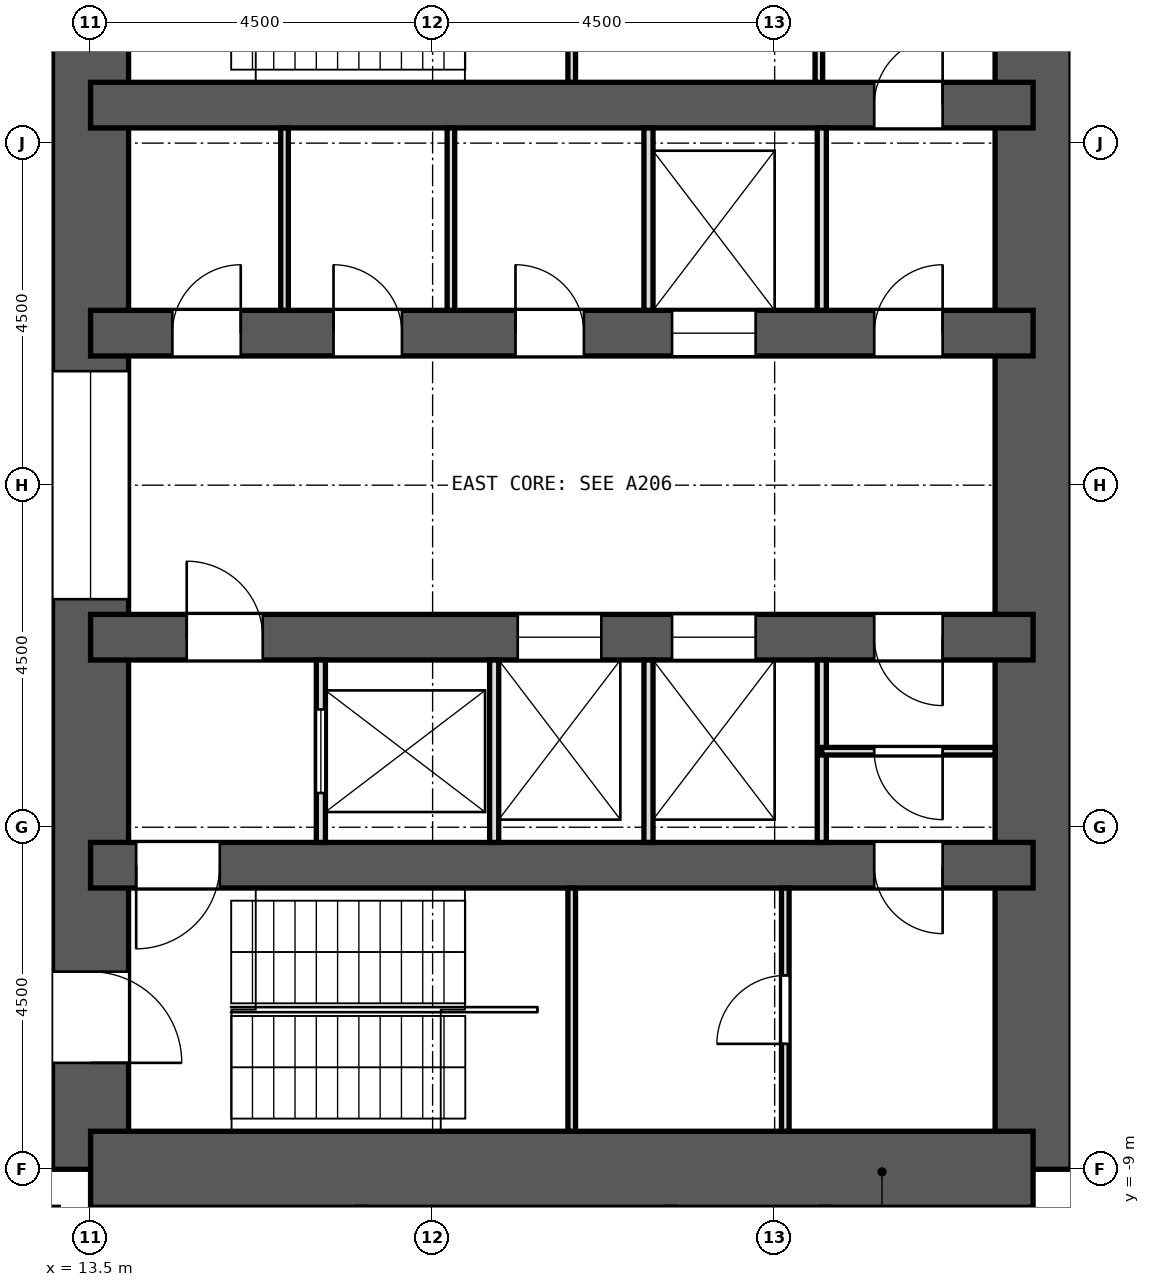
"""IFC4 building model, lengths in metres.
Left out: names, types, materials, properties, quantities, classifications, styles, units other than length and angle.
Written with IfcOpenShell. Run it as: python <this file> out.ifc"""

import sys

from ifc_helpers import new_model, si_unit, direction, frame, frame_2d, origin, place, context, subcontext, project, spatial, rectangle, extrude, element, fill, save


model = new_model("IFC4")
c1 = context("Model", 3, precision=1e-05, world=origin(), true_north=direction((0.0, 1.0)))
c2 = subcontext(c1, "Body", "Model", "MODEL_VIEW")
j1 = project(units=[si_unit("LENGTHUNIT", "METRE"), si_unit("PLANEANGLEUNIT", "RADIAN")], contexts=[c1])
p1 = place(None, origin())
s1 = spatial("IfcSite", under=j1, at=p1, CompositionType="ELEMENT")
p2 = place(p1, origin())
s2 = spatial("IfcBuilding", under=s1, at=p2, CompositionType="ELEMENT")
p3 = place(p2, frame((0.0, 0.0, 13.4)))
s3 = spatial("IfcBuildingStorey", under=s2, at=p3, CompositionType="ELEMENT", Elevation=13.4)
p4 = place(p3, frame((13.5, -9.0, 0.0), z_axis=(0.0, 0.0, 1.0), x_axis=(0.0, 1.0, 0.0)))
e1 = element("IfcWall", 1, at=p4, inside=s3, PredefinedType="SHEAR", context=c2, shape_type="SweptSolid", body=[
    extrude(rectangle(XDim=18.0, YDim=1.0, at=frame_2d((9.0, 0.0))), origin(), (0.0, 0.0, 1.0), 4.2),
])
p5 = place(p4, frame((15.4, 0.0, 0.0)))
e2 = element("IfcOpeningElement", 2, at=p5, cuts=e1, PredefinedType="OPENING", context=c2, shape_type="SweptSolid", body=[
    extrude(rectangle(XDim=1.2, YDim=2.1, at=frame_2d((0.6, 1.05))), frame((0.0, 0.512, 0.0), z_axis=(0.0, -1.0, 0.0), x_axis=(1.0, 0.0, 0.0)), (0.0, 0.0, 1.0), 1.024),
])
p6 = place(p4, frame((1.4, 0.0, 0.0)))
e3 = element("IfcOpeningElement", 3, at=p6, cuts=e1, PredefinedType="OPENING", context=c2, shape_type="SweptSolid", body=[
    extrude(rectangle(XDim=1.2, YDim=2.1, at=frame_2d((0.6, 1.05))), frame((0.0, 0.512, 0.0), z_axis=(0.0, -1.0, 0.0), x_axis=(1.0, 0.0, 0.0)), (0.0, 0.0, 1.0), 1.024),
])
p7 = place(p4, frame((7.5, 0.0, 0.0)))
e4 = element("IfcOpeningElement", 4, at=p7, cuts=e1, PredefinedType="OPENING", context=c2, shape_type="SweptSolid", body=[
    extrude(rectangle(XDim=3.0, YDim=2.4, at=frame_2d((1.5, 1.2))), frame((0.0, 0.512, 0.0), z_axis=(0.0, -1.0, 0.0), x_axis=(1.0, 0.0, 0.0)), (0.0, 0.0, 1.0), 1.024),
])
p8 = place(p3, frame((25.9, -9.0, 0.0), z_axis=(0.0, 0.0, 1.0), x_axis=(0.0, 1.0, 0.0)))
e5 = element("IfcWall", 5, at=p8, inside=s3, PredefinedType="SHEAR", context=c2, shape_type="SweptSolid", body=[
    extrude(rectangle(XDim=18.0, YDim=1.0, at=frame_2d((9.0, 0.0))), origin(), (0.0, 0.0, 1.0), 4.2),
])
p9 = place(p3, frame((13.5, -9.0, 0.0), z_axis=(0.0, 0.0, 1.0), x_axis=(1.0, 0.0, 0.0)))
e6 = element("IfcWall", 6, at=p9, inside=s3, PredefinedType="SHEAR", context=c2, shape_type="SweptSolid", body=[
    extrude(rectangle(XDim=12.4, YDim=1.0, at=frame_2d((6.2, 0.0))), origin(), (0.0, 0.0, 1.0), 4.2),
])
p10 = place(p3, frame((13.5, 5.0, 0.0), z_axis=(0.0, 0.0, 1.0), x_axis=(1.0, 0.0, 0.0)))
e7 = element("IfcWall", 7, at=p10, inside=s3, PredefinedType="SHEAR", context=c2, shape_type="SweptSolid", body=[
    extrude(rectangle(XDim=12.4, YDim=0.6, at=frame_2d((6.2, 0.0))), origin(), (0.0, 0.0, 1.0), 4.2),
])
p11 = place(p10, frame((10.31, 0.0, 0.0)))
e8 = element("IfcOpeningElement", 8, at=p11, cuts=e7, PredefinedType="OPENING", context=c2, shape_type="SweptSolid", body=[
    extrude(rectangle(XDim=0.9, YDim=2.1, at=frame_2d((0.45, 1.05))), frame((0.0, 0.312, 0.0), z_axis=(0.0, -1.0, 0.0), x_axis=(1.0, 0.0, 0.0)), (0.0, 0.0, 1.0), 0.624),
])
p12 = place(p3, frame((13.5, -5.0, 0.0), z_axis=(0.0, 0.0, 1.0), x_axis=(1.0, 0.0, 0.0)))
e9 = element("IfcWall", 9, at=p12, inside=s3, PredefinedType="SHEAR", context=c2, shape_type="SweptSolid", body=[
    extrude(rectangle(XDim=12.4, YDim=0.6, at=frame_2d((6.2, 0.0))), origin(), (0.0, 0.0, 1.0), 4.2),
])
p13 = place(p12, frame((10.31, 0.0, 0.0)))
e10 = element("IfcOpeningElement", 10, at=p13, cuts=e9, PredefinedType="OPENING", context=c2, shape_type="SweptSolid", body=[
    extrude(rectangle(XDim=0.9, YDim=2.1, at=frame_2d((0.45, 1.05))), frame((0.0, 0.312, 0.0), z_axis=(0.0, -1.0, 0.0), x_axis=(1.0, 0.0, 0.0)), (0.0, 0.0, 1.0), 0.624),
])
p14 = place(p12, frame((0.6, 0.0, 0.0)))
e11 = element("IfcOpeningElement", 11, at=p14, cuts=e9, PredefinedType="OPENING", context=c2, shape_type="SweptSolid", body=[
    extrude(rectangle(XDim=1.1, YDim=2.1, at=frame_2d((0.55, 1.05))), frame((0.0, 0.312, 0.0), z_axis=(0.0, -1.0, 0.0), x_axis=(1.0, 0.0, 0.0)), (0.0, 0.0, 1.0), 0.624),
])
p15 = place(p3, frame((13.5, 2.0, 0.0), z_axis=(0.0, 0.0, 1.0), x_axis=(1.0, 0.0, 0.0)))
e12 = element("IfcWall", 12, at=p15, inside=s3, PredefinedType="SHEAR", context=c2, shape_type="SweptSolid", body=[
    extrude(rectangle(XDim=12.4, YDim=0.6, at=frame_2d((6.2, 0.0))), origin(), (0.0, 0.0, 1.0), 4.2),
])
p16 = place(p15, frame((7.65, 0.0, 0.0)))
e13 = element("IfcOpeningElement", 13, at=p16, cuts=e12, PredefinedType="OPENING", context=c2, shape_type="SweptSolid", body=[
    extrude(rectangle(XDim=1.1, YDim=2.1, at=frame_2d((0.55, 1.05))), frame((0.0, 0.312, 0.0), z_axis=(0.0, -1.0, 0.0), x_axis=(1.0, 0.0, 0.0)), (0.0, 0.0, 1.0), 0.624),
])
p17 = place(p15, frame((1.076, 0.0, 0.0)))
e14 = element("IfcOpeningElement", 14, at=p17, cuts=e12, PredefinedType="OPENING", context=c2, shape_type="SweptSolid", body=[
    extrude(rectangle(XDim=0.9, YDim=2.1, at=frame_2d((0.45, 1.05))), frame((0.0, 0.312, 0.0), z_axis=(0.0, -1.0, 0.0), x_axis=(1.0, 0.0, 0.0)), (0.0, 0.0, 1.0), 0.624),
])
p18 = place(p15, frame((3.196, 0.0, 0.0)))
e15 = element("IfcOpeningElement", 15, at=p18, cuts=e12, PredefinedType="OPENING", context=c2, shape_type="SweptSolid", body=[
    extrude(rectangle(XDim=0.9, YDim=2.1, at=frame_2d((0.45, 1.05))), frame((0.0, 0.312, 0.0), z_axis=(0.0, -1.0, 0.0), x_axis=(1.0, 0.0, 0.0)), (0.0, 0.0, 1.0), 0.624),
])
p19 = place(p15, frame((5.59, 0.0, 0.0)))
e16 = element("IfcOpeningElement", 16, at=p19, cuts=e12, PredefinedType="OPENING", context=c2, shape_type="SweptSolid", body=[
    extrude(rectangle(XDim=0.9, YDim=2.1, at=frame_2d((0.45, 1.05))), frame((0.0, 0.312, 0.0), z_axis=(0.0, -1.0, 0.0), x_axis=(1.0, 0.0, 0.0)), (0.0, 0.0, 1.0), 0.624),
])
p20 = place(p15, frame((10.31, 0.0, 0.0)))
e17 = element("IfcOpeningElement", 17, at=p20, cuts=e12, PredefinedType="OPENING", context=c2, shape_type="SweptSolid", body=[
    extrude(rectangle(XDim=0.9, YDim=2.1, at=frame_2d((0.45, 1.05))), frame((0.0, 0.312, 0.0), z_axis=(0.0, -1.0, 0.0), x_axis=(1.0, 0.0, 0.0)), (0.0, 0.0, 1.0), 0.624),
])
p21 = place(p3, frame((13.5, -2.0, 0.0), z_axis=(0.0, 0.0, 1.0), x_axis=(1.0, 0.0, 0.0)))
e18 = element("IfcWall", 18, at=p21, inside=s3, PredefinedType="SHEAR", context=c2, shape_type="SweptSolid", body=[
    extrude(rectangle(XDim=12.4, YDim=0.6, at=frame_2d((6.2, 0.0))), origin(), (0.0, 0.0, 1.0), 4.2),
])
p22 = place(p21, frame((5.62, 0.0, 0.0)))
e19 = element("IfcOpeningElement", 19, at=p22, cuts=e18, PredefinedType="OPENING", context=c2, shape_type="SweptSolid", body=[
    extrude(rectangle(XDim=1.1, YDim=2.1, at=frame_2d((0.55, 1.05))), frame((0.0, 0.312, 0.0), z_axis=(0.0, -1.0, 0.0), x_axis=(1.0, 0.0, 0.0)), (0.0, 0.0, 1.0), 0.624),
])
p23 = place(p21, frame((7.65, 0.0, 0.0)))
e20 = element("IfcOpeningElement", 20, at=p23, cuts=e18, PredefinedType="OPENING", context=c2, shape_type="SweptSolid", body=[
    extrude(rectangle(XDim=1.1, YDim=2.1, at=frame_2d((0.55, 1.05))), frame((0.0, 0.312, 0.0), z_axis=(0.0, -1.0, 0.0), x_axis=(1.0, 0.0, 0.0)), (0.0, 0.0, 1.0), 0.624),
])
p24 = place(p21, frame((1.265, 0.0, 0.0)))
e21 = element("IfcOpeningElement", 21, at=p24, cuts=e18, PredefinedType="OPENING", context=c2, shape_type="SweptSolid", body=[
    extrude(rectangle(XDim=1.0, YDim=2.1, at=frame_2d((0.5, 1.05))), frame((0.0, 0.312, 0.0), z_axis=(0.0, -1.0, 0.0), x_axis=(1.0, 0.0, 0.0)), (0.0, 0.0, 1.0), 0.624),
])
p25 = place(p21, frame((10.31, 0.0, 0.0)))
e22 = element("IfcOpeningElement", 22, at=p25, cuts=e18, PredefinedType="OPENING", context=c2, shape_type="SweptSolid", body=[
    extrude(rectangle(XDim=0.9, YDim=2.1, at=frame_2d((0.45, 1.05))), frame((0.0, 0.312, 0.0), z_axis=(0.0, -1.0, 0.0), x_axis=(1.0, 0.0, 0.0)), (0.0, 0.0, 1.0), 0.624),
])
p26 = place(p3, frame((26.328, -11.255, 0.0), z_axis=(0.0, 0.0, 1.0), x_axis=(0.342034744565, 0.939687306241, 0.0)))
e23 = element("IfcWall", 23, at=p26, inside=s3, PredefinedType="SOLIDWALL", context=c2, shape_type="SweptSolid", body=[
    extrude(rectangle(XDim=4.099, YDim=0.6, at=frame_2d((2.05, 0.0))), origin(), (0.0, 0.0, 1.0), 3.65),
])
for number, where, z_axis, x_axis in (
    (24, (16.052, 2.3, 0.0), (0.0, 0.0, 1.0), (0.0, 1.0, 0.0)),
    (25, (18.241, 2.3, 0.0), (0.0, 0.0, 1.0), (0.0, 1.0, 0.0)),
):
    element("IfcWall", number, at=place(p3, frame(where, z_axis=z_axis, x_axis=x_axis)), inside=s3, PredefinedType="PARTITIONING", context=c2, shape_type="SweptSolid", body=[
        extrude(rectangle(XDim=2.4, YDim=0.1, at=frame_2d((1.2, 0.0))), origin(), (0.0, 0.0, 1.0), 3.65),
    ])
for number, where, z_axis, x_axis in (
    (26, (20.84, 2.3, 0.0), (0.0, 0.0, 1.0), (0.0, 1.0, 0.0)),
    (27, (23.12, 2.3, 0.0), (0.0, 0.0, 1.0), (0.0, 1.0, 0.0)),
):
    element("IfcWall", number, at=place(p3, frame(where, z_axis=z_axis, x_axis=x_axis)), inside=s3, PredefinedType="PARTITIONING", context=c2, shape_type="SweptSolid", body=[
        extrude(rectangle(XDim=2.4, YDim=0.12, at=frame_2d((1.2, 0.0))), origin(), (0.0, 0.0, 1.0), 3.65),
    ])
p27 = place(p3, frame((16.53, -4.7, 0.0), z_axis=(0.0, 0.0, 1.0), x_axis=(0.0, 1.0, 0.0)))
e28 = element("IfcWall", 28, at=p27, inside=s3, PredefinedType="PARTITIONING", context=c2, shape_type="SweptSolid", body=[
    extrude(rectangle(XDim=2.4, YDim=0.12, at=frame_2d((1.2, 0.0))), origin(), (0.0, 0.0, 1.0), 3.65),
])
p28 = place(p27, frame((0.65, 0.0, 0.0)))
e29 = element("IfcOpeningElement", 29, at=p28, cuts=e28, PredefinedType="OPENING", context=c2, shape_type="SweptSolid", body=[
    extrude(rectangle(XDim=1.1, YDim=2.1, at=frame_2d((0.55, 1.05))), frame((0.0, 0.072, 0.0), z_axis=(0.0, -1.0, 0.0), x_axis=(1.0, 0.0, 0.0)), (0.0, 0.0, 1.0), 0.144),
])
for number, where, z_axis, x_axis in (
    (30, (18.81, -4.7, 0.0), (0.0, 0.0, 1.0), (0.0, 1.0, 0.0)),
    (31, (20.84, -4.7, 0.0), (0.0, 0.0, 1.0), (0.0, 1.0, 0.0)),
    (32, (23.12, -4.7, 0.0), (0.0, 0.0, 1.0), (0.0, 1.0, 0.0)),
):
    element("IfcWall", number, at=place(p3, frame(where, z_axis=z_axis, x_axis=x_axis)), inside=s3, PredefinedType="PARTITIONING", context=c2, shape_type="SweptSolid", body=[
        extrude(rectangle(XDim=2.4, YDim=0.12, at=frame_2d((1.2, 0.0))), origin(), (0.0, 0.0, 1.0), 3.65),
    ])
p29 = place(p3, frame((23.12, -3.5, 0.0), z_axis=(0.0, 0.0, 1.0), x_axis=(1.0, 0.0, 0.0)))
e33 = element("IfcWall", 33, at=p29, inside=s3, PredefinedType="PARTITIONING", context=c2, shape_type="SweptSolid", body=[
    extrude(rectangle(XDim=2.28, YDim=0.1, at=frame_2d((1.14, 0.0))), origin(), (0.0, 0.0, 1.0), 3.65),
])
p30 = place(p29, frame((0.69, 0.0, 0.0)))
e34 = element("IfcOpeningElement", 34, at=p30, cuts=e33, PredefinedType="OPENING", context=c2, shape_type="SweptSolid", body=[
    extrude(rectangle(XDim=0.9, YDim=2.1, at=frame_2d((0.45, 1.05))), frame((0.0, 0.062, 0.0), z_axis=(0.0, -1.0, 0.0), x_axis=(1.0, 0.0, 0.0)), (0.0, 0.0, 1.0), 0.124),
])
p31 = place(p3, frame((19.83, 5.3, 0.0), z_axis=(0.0, 0.0, 1.0), x_axis=(0.0, 1.0, 0.0)))
e35 = element("IfcWall", 35, at=p31, inside=s3, PredefinedType="PARTITIONING", context=c2, shape_type="SweptSolid", body=[
    extrude(rectangle(XDim=3.2, YDim=0.1, at=frame_2d((1.6, 0.0))), origin(), (0.0, 0.0, 1.0), 3.65),
])
p32 = place(p3, frame((23.082, 5.3, 0.0), z_axis=(0.0, 0.0, 1.0), x_axis=(0.0, 1.0, 0.0)))
e36 = element("IfcWall", 36, at=p32, inside=s3, PredefinedType="PARTITIONING", context=c2, shape_type="SweptSolid", body=[
    extrude(rectangle(XDim=3.2, YDim=0.1, at=frame_2d((1.6, 0.0))), origin(), (0.0, 0.0, 1.0), 3.65),
])
p33 = place(p32, frame((1.15, 0.0, 0.0)))
e37 = element("IfcOpeningElement", 37, at=p33, cuts=e36, PredefinedType="OPENING", context=c2, shape_type="SweptSolid", body=[
    extrude(rectangle(XDim=0.9, YDim=2.1, at=frame_2d((0.45, 1.05))), frame((0.0, 0.062, 0.0), z_axis=(0.0, -1.0, 0.0), x_axis=(1.0, 0.0, 0.0)), (0.0, 0.0, 1.0), 0.124),
])
p34 = place(p3, frame((19.83, -8.5, 0.0), z_axis=(0.0, 0.0, 1.0), x_axis=(0.0, 1.0, 0.0)))
e38 = element("IfcWall", 38, at=p34, inside=s3, PredefinedType="PARTITIONING", context=c2, shape_type="SweptSolid", body=[
    extrude(rectangle(XDim=3.2, YDim=0.1, at=frame_2d((1.6, 0.0))), origin(), (0.0, 0.0, 1.0), 3.65),
])
p35 = place(p3, frame((22.64, -8.5, 0.0), z_axis=(0.0, 0.0, 1.0), x_axis=(0.0, 1.0, 0.0)))
e39 = element("IfcWall", 39, at=p35, inside=s3, PredefinedType="PARTITIONING", context=c2, shape_type="SweptSolid", body=[
    extrude(rectangle(XDim=3.2, YDim=0.1, at=frame_2d((1.6, 0.0))), origin(), (0.0, 0.0, 1.0), 3.65),
])
p36 = place(p35, frame((1.15, 0.0, 0.0)))
e40 = element("IfcOpeningElement", 40, at=p36, cuts=e39, PredefinedType="OPENING", context=c2, shape_type="SweptSolid", body=[
    extrude(rectangle(XDim=0.9, YDim=2.1, at=frame_2d((0.45, 1.05))), frame((0.0, 0.062, 0.0), z_axis=(0.0, -1.0, 0.0), x_axis=(1.0, 0.0, 0.0)), (0.0, 0.0, 1.0), 0.124),
])
p37 = place(p16, origin())
e41 = element("IfcDoor", 41, at=p37, inside=s3, OperationType="DOUBLE_DOOR_SLIDING", PredefinedType="DOOR", context=c2, shape_type="SweptSolid", body=[
    extrude(rectangle(XDim=1.1, YDim=2.1, at=frame_2d((0.55, 1.05))), frame((0.0, 0.025, 0.0), z_axis=(0.0, -1.0, 0.0), x_axis=(1.0, 0.0, 0.0)), (0.0, 0.0, 1.0), 0.05),
])
fill(e13, e41)
p38 = place(p28, origin())
e42 = element("IfcDoor", 42, at=p38, inside=s3, OperationType="DOUBLE_DOOR_SLIDING", PredefinedType="DOOR", context=c2, shape_type="SweptSolid", body=[
    extrude(rectangle(XDim=1.1, YDim=2.1, at=frame_2d((0.55, 1.05))), frame((0.0, 0.025, 0.0), z_axis=(0.0, -1.0, 0.0), x_axis=(1.0, 0.0, 0.0)), (0.0, 0.0, 1.0), 0.05),
])
fill(e29, e42)
p39 = place(p22, origin())
e43 = element("IfcDoor", 43, at=p39, inside=s3, OperationType="DOUBLE_DOOR_SLIDING", PredefinedType="DOOR", context=c2, shape_type="SweptSolid", body=[
    extrude(rectangle(XDim=1.1, YDim=2.1, at=frame_2d((0.55, 1.05))), frame((0.0, 0.025, 0.0), z_axis=(0.0, -1.0, 0.0), x_axis=(1.0, 0.0, 0.0)), (0.0, 0.0, 1.0), 0.05),
])
fill(e19, e43)
p40 = place(p23, origin())
e44 = element("IfcDoor", 44, at=p40, inside=s3, OperationType="DOUBLE_DOOR_SLIDING", PredefinedType="DOOR", context=c2, shape_type="SweptSolid", body=[
    extrude(rectangle(XDim=1.1, YDim=2.1, at=frame_2d((0.55, 1.05))), frame((0.0, 0.025, 0.0), z_axis=(0.0, -1.0, 0.0), x_axis=(1.0, 0.0, 0.0)), (0.0, 0.0, 1.0), 0.05),
])
fill(e20, e44)
p41 = place(p17, origin())
e45 = element("IfcDoor", 45, at=p41, inside=s3, OperationType="SINGLE_SWING_RIGHT", PredefinedType="DOOR", context=c2, shape_type="SweptSolid", body=[
    extrude(rectangle(XDim=0.9, YDim=2.1, at=frame_2d((0.45, 1.05))), frame((0.0, 0.025, 0.0), z_axis=(0.0, -1.0, 0.0), x_axis=(1.0, 0.0, 0.0)), (0.0, 0.0, 1.0), 0.05),
])
fill(e14, e45)
p42 = place(p18, origin())
e46 = element("IfcDoor", 46, at=p42, inside=s3, OperationType="SINGLE_SWING_LEFT", PredefinedType="DOOR", context=c2, shape_type="SweptSolid", body=[
    extrude(rectangle(XDim=0.9, YDim=2.1, at=frame_2d((0.45, 1.05))), frame((0.0, 0.025, 0.0), z_axis=(0.0, -1.0, 0.0), x_axis=(1.0, 0.0, 0.0)), (0.0, 0.0, 1.0), 0.05),
])
fill(e15, e46)
p43 = place(p19, origin())
e47 = element("IfcDoor", 47, at=p43, inside=s3, OperationType="SINGLE_SWING_LEFT", PredefinedType="DOOR", context=c2, shape_type="SweptSolid", body=[
    extrude(rectangle(XDim=0.9, YDim=2.1, at=frame_2d((0.45, 1.05))), frame((0.0, 0.025, 0.0), z_axis=(0.0, -1.0, 0.0), x_axis=(1.0, 0.0, 0.0)), (0.0, 0.0, 1.0), 0.05),
])
fill(e16, e47)
p44 = place(p20, origin())
e48 = element("IfcDoor", 48, at=p44, inside=s3, OperationType="SINGLE_SWING_RIGHT", PredefinedType="DOOR", context=c2, shape_type="SweptSolid", body=[
    extrude(rectangle(XDim=0.9, YDim=2.1, at=frame_2d((0.45, 1.05))), frame((0.0, 0.025, 0.0), z_axis=(0.0, -1.0, 0.0), x_axis=(1.0, 0.0, 0.0)), (0.0, 0.0, 1.0), 0.05),
])
fill(e17, e48)
p45 = place(p24, origin())
e49 = element("IfcDoor", 49, at=p45, inside=s3, OperationType="SINGLE_SWING_LEFT", PredefinedType="DOOR", context=c2, shape_type="SweptSolid", body=[
    extrude(rectangle(XDim=1.0, YDim=2.1, at=frame_2d((0.5, 1.05))), frame((0.0, 0.025, 0.0), z_axis=(0.0, -1.0, 0.0), x_axis=(1.0, 0.0, 0.0)), (0.0, 0.0, 1.0), 0.05),
])
fill(e21, e49)
p46 = place(p25, frame((0.9, 0.0, 0.0), z_axis=(0.0, 0.0, 1.0), x_axis=(-1.0, 0.0, 0.0)))
e50 = element("IfcDoor", 50, at=p46, inside=s3, OperationType="SINGLE_SWING_LEFT", PredefinedType="DOOR", context=c2, shape_type="SweptSolid", body=[
    extrude(rectangle(XDim=0.9, YDim=2.1, at=frame_2d((0.45, 1.05))), frame((0.0, 0.025, 0.0), z_axis=(0.0, -1.0, 0.0), x_axis=(1.0, 0.0, 0.0)), (0.0, 0.0, 1.0), 0.05),
])
fill(e22, e50)
p47 = place(p11, origin())
e51 = element("IfcDoor", 51, at=p47, inside=s3, OperationType="SINGLE_SWING_RIGHT", PredefinedType="DOOR", context=c2, shape_type="SweptSolid", body=[
    extrude(rectangle(XDim=0.9, YDim=2.1, at=frame_2d((0.45, 1.05))), frame((0.0, 0.025, 0.0), z_axis=(0.0, -1.0, 0.0), x_axis=(1.0, 0.0, 0.0)), (0.0, 0.0, 1.0), 0.05),
])
fill(e8, e51)
p48 = place(p30, frame((0.9, 0.0, 0.0), z_axis=(0.0, 0.0, 1.0), x_axis=(-1.0, 0.0, 0.0)))
e52 = element("IfcDoor", 52, at=p48, inside=s3, OperationType="SINGLE_SWING_LEFT", PredefinedType="DOOR", context=c2, shape_type="SweptSolid", body=[
    extrude(rectangle(XDim=0.9, YDim=2.1, at=frame_2d((0.45, 1.05))), frame((0.0, 0.025, 0.0), z_axis=(0.0, -1.0, 0.0), x_axis=(1.0, 0.0, 0.0)), (0.0, 0.0, 1.0), 0.05),
])
fill(e34, e52)
p49 = place(p36, origin())
e53 = element("IfcDoor", 53, at=p49, inside=s3, OperationType="SINGLE_SWING_LEFT", PredefinedType="DOOR", context=c2, shape_type="SweptSolid", body=[
    extrude(rectangle(XDim=0.9, YDim=2.1, at=frame_2d((0.45, 1.05))), frame((0.0, 0.025, 0.0), z_axis=(0.0, -1.0, 0.0), x_axis=(1.0, 0.0, 0.0)), (0.0, 0.0, 1.0), 0.05),
])
fill(e40, e53)
p50 = place(p13, frame((0.9, 0.0, 0.0), z_axis=(0.0, 0.0, 1.0), x_axis=(-1.0, 0.0, 0.0)))
e54 = element("IfcDoor", 54, at=p50, inside=s3, OperationType="SINGLE_SWING_LEFT", PredefinedType="DOOR", context=c2, shape_type="SweptSolid", body=[
    extrude(rectangle(XDim=0.9, YDim=2.1, at=frame_2d((0.45, 1.05))), frame((0.0, 0.025, 0.0), z_axis=(0.0, -1.0, 0.0), x_axis=(1.0, 0.0, 0.0)), (0.0, 0.0, 1.0), 0.05),
])
fill(e10, e54)
p51 = place(p14, frame((1.1, 0.0, 0.0), z_axis=(0.0, 0.0, 1.0), x_axis=(-1.0, 0.0, 0.0)))
e55 = element("IfcDoor", 55, at=p51, inside=s3, OperationType="SINGLE_SWING_RIGHT", PredefinedType="DOOR", context=c2, shape_type="SweptSolid", body=[
    extrude(rectangle(XDim=1.1, YDim=2.1, at=frame_2d((0.55, 1.05))), frame((0.0, 0.025, 0.0), z_axis=(0.0, -1.0, 0.0), x_axis=(1.0, 0.0, 0.0)), (0.0, 0.0, 1.0), 0.05),
])
fill(e11, e55)
p52 = place(p6, frame((1.2, 0.0, 0.0), z_axis=(0.0, 0.0, 1.0), x_axis=(-1.0, 0.0, 0.0)))
e56 = element("IfcDoor", 56, at=p52, inside=s3, OperationType="SINGLE_SWING_RIGHT", PredefinedType="DOOR", context=c2, shape_type="SweptSolid", body=[
    extrude(rectangle(XDim=1.2, YDim=2.1, at=frame_2d((0.6, 1.05))), frame((0.0, 0.025, 0.0), z_axis=(0.0, -1.0, 0.0), x_axis=(1.0, 0.0, 0.0)), (0.0, 0.0, 1.0), 0.05),
])
fill(e3, e56)
p53 = place(p7, origin())
e57 = element("IfcDoor", 57, at=p53, inside=s3, OperationType="DOUBLE_DOOR_SLIDING", PredefinedType="DOOR", context=c2, shape_type="SweptSolid", body=[
    extrude(rectangle(XDim=3.0, YDim=2.4, at=frame_2d((1.5, 1.2))), frame((0.0, 0.025, 0.0), z_axis=(0.0, -1.0, 0.0), x_axis=(1.0, 0.0, 0.0)), (0.0, 0.0, 1.0), 0.05),
])
fill(e4, e57)
save(model, sys.argv[1])
